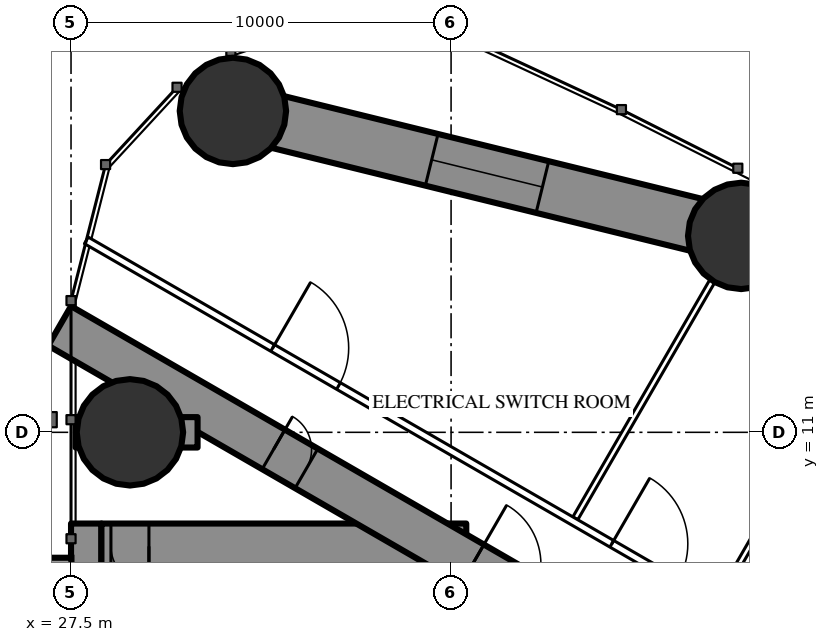
"""IFC4 building model, lengths in metres.
Left out: names, types, materials, properties, quantities, classifications, styles, units other than length and angle.
Written with IfcOpenShell. Run it as: python <this file> out.ifc"""

import sys

from ifc_helpers import new_model, si_unit, direction, frame, frame_2d, origin, origin_2d, place, context, subcontext, project, spatial, rectangle, circle, extrude, element, fill, save


model = new_model("IFC4")
c1 = context("Model", 3, precision=1e-05, world=origin(), true_north=direction((0.0, 1.0)))
c2 = subcontext(c1, "Body", "Model", "MODEL_VIEW")
j1 = project(units=[si_unit("LENGTHUNIT", "METRE"), si_unit("PLANEANGLEUNIT", "RADIAN")], contexts=[c1])
p1 = place(None, origin())
s1 = spatial("IfcSite", under=j1, at=p1, CompositionType="ELEMENT")
p2 = place(p1, origin())
s2 = spatial("IfcBuilding", under=s1, at=p2, CompositionType="ELEMENT")
p3 = place(p2, frame((0.0, 0.0, 201.8)))
s3 = spatial("IfcBuildingStorey", under=s2, at=p3, CompositionType="ELEMENT", Elevation=201.8)
for number, where, z_axis, x_axis in (
    (1, (31.76, 19.456, 0.0), (0.0, 0.0, 1.0), (1.0, 0.0, 0.0)),
    (2, (29.05, 11.0, 0.0), (0.0, 0.0, 1.0), (1.0, 0.0, 0.0)),
    (3, (45.134, 16.168, 0.0), (0.0, 0.0, 1.0), (1.0, 0.0, 0.0)),
):
    element("IfcColumn", number, at=place(p3, frame(where, z_axis=z_axis, x_axis=x_axis)), inside=s3, PredefinedType="COLUMN", context=c2, shape_type="SweptSolid", body=[
        extrude(circle(Radius=1.4, at=origin_2d()), origin(), (0.0, 0.0, 1.0), 3.5),
    ])
p4 = place(p3, frame((27.9, -8.6, 0.0), z_axis=(0.0, 0.0, 1.0), x_axis=(0.0, 1.0, 0.0)))
e4 = element("IfcWall", 4, at=p4, inside=s3, PredefinedType="SHEAR", context=c2, shape_type="SweptSolid", body=[
    extrude(rectangle(XDim=17.2, YDim=0.8, at=frame_2d((8.6, 0.0))), origin(), (0.0, 0.0, 1.0), 3.5),
])
p5 = place(p4, frame((2.45, 0.0, 0.6)))
e5 = element("IfcOpeningElement", 5, at=p5, cuts=e4, PredefinedType="OPENING", context=c2, shape_type="SweptSolid", body=[
    extrude(rectangle(XDim=0.6, YDim=2.1, at=frame_2d((0.3, 1.05))), frame((0.0, 0.41, 0.0), z_axis=(0.0, -1.0, 0.0), x_axis=(1.0, 0.0, 0.0)), (0.0, 0.0, 1.0), 0.82),
])
p6 = place(p4, frame((14.15, 0.0, 0.6)))
e6 = element("IfcOpeningElement", 6, at=p6, cuts=e4, PredefinedType="OPENING", context=c2, shape_type="SweptSolid", body=[
    extrude(rectangle(XDim=0.6, YDim=2.1, at=frame_2d((0.3, 1.05))), frame((0.0, 0.41, 0.0), z_axis=(0.0, -1.0, 0.0), x_axis=(1.0, 0.0, 0.0)), (0.0, 0.0, 1.0), 0.82),
])
p7 = place(p3, frame((37.3, -8.6, 0.0), z_axis=(0.0, 0.0, 1.0), x_axis=(0.0, 1.0, 0.0)))
e7 = element("IfcWall", 7, at=p7, inside=s3, PredefinedType="SHEAR", context=c2, shape_type="SweptSolid", body=[
    extrude(rectangle(XDim=17.2, YDim=1.2, at=frame_2d((8.6, 0.0))), origin(), (0.0, 0.0, 1.0), 3.5),
])
p8 = place(p7, frame((7.7, 0.0, 0.0)))
e8 = element("IfcOpeningElement", 8, at=p8, cuts=e7, PredefinedType="OPENING", context=c2, shape_type="SweptSolid", body=[
    extrude(rectangle(XDim=1.8, YDim=2.2, at=frame_2d((0.9, 1.1))), frame((0.0, 0.61, 0.0), z_axis=(0.0, -1.0, 0.0), x_axis=(1.0, 0.0, 0.0)), (0.0, 0.0, 1.0), 1.22),
])
p9 = place(p3, frame((28.3, 8.0, 0.0), z_axis=(0.0, 0.0, 1.0), x_axis=(1.0, 0.0, 0.0)))
e9 = element("IfcWall", 9, at=p9, inside=s3, PredefinedType="SHEAR", context=c2, shape_type="SweptSolid", body=[
    extrude(rectangle(XDim=8.4, YDim=1.2, at=frame_2d((4.2, 0.0))), origin(), (0.0, 0.0, 1.0), 3.5),
])
p10 = place(p9, frame((0.25, 0.0, 0.0)))
e10 = element("IfcOpeningElement", 10, at=p10, cuts=e9, PredefinedType="OPENING", context=c2, shape_type="SweptSolid", body=[
    extrude(rectangle(XDim=1.0, YDim=2.2, at=frame_2d((0.5, 1.1))), frame((0.0, 0.61, 0.0), z_axis=(0.0, -1.0, 0.0), x_axis=(1.0, 0.0, 0.0)), (0.0, 0.0, 1.0), 1.22),
])
p11 = place(p3, frame((27.2, 13.8, 0.0), z_axis=(0.0, 0.0, 1.0), x_axis=(0.866024515034, -0.500001539357, 0.0)))
e11 = element("IfcWall", 11, at=p11, inside=s3, PredefinedType="SHEAR", context=c2, shape_type="SweptSolid", body=[
    extrude(rectangle(XDim=26.907, YDim=1.2, at=frame_2d((13.454, 0.0))), origin(), (0.0, 0.0, 1.0), 3.5),
])
p12 = place(p11, frame((6.5, 0.0, 0.0)))
e12 = element("IfcOpeningElement", 12, at=p12, cuts=e11, PredefinedType="OPENING", context=c2, shape_type="SweptSolid", body=[
    extrude(rectangle(XDim=1.0, YDim=2.2, at=frame_2d((0.5, 1.1))), frame((0.0, 0.61, 0.0), z_axis=(0.0, -1.0, 0.0), x_axis=(1.0, 0.0, 0.0)), (0.0, 0.0, 1.0), 1.22),
])
p13 = place(p11, frame((12.545, 0.0, 0.0)))
e13 = element("IfcOpeningElement", 13, at=p13, cuts=e11, PredefinedType="OPENING", context=c2, shape_type="SweptSolid", body=[
    extrude(rectangle(XDim=1.8, YDim=2.2, at=frame_2d((0.9, 1.1))), frame((0.0, 0.61, 0.0), z_axis=(0.0, -1.0, 0.0), x_axis=(1.0, 0.0, 0.0)), (0.0, 0.0, 1.0), 1.22),
])
p14 = place(p3, frame((27.62, 11.0, 0.0), z_axis=(0.0, 0.0, 1.0), x_axis=(1.0, 0.0, 0.0)))
e14 = element("IfcWall", 14, at=p14, inside=s3, PredefinedType="SHEAR", context=c2, shape_type="SweptSolid", body=[
    extrude(rectangle(XDim=3.209, YDim=0.8, at=frame_2d((1.605, 0.0))), origin(), (0.0, 0.0, 1.0), 3.5),
])
p15 = place(p3, frame((48.897, 14.121, 0.0), z_axis=(0.0, 0.0, 1.0), x_axis=(-0.878404597051, 0.477917737566, 0.0)))
e15 = element("IfcWall", 15, at=p15, inside=s3, PredefinedType="SHEAR", context=c2, shape_type="SweptSolid", body=[
    extrude(rectangle(XDim=4.285, YDim=1.4, at=frame_2d((2.143, 0.0))), origin(), (0.0, 0.0, 1.0), 3.5),
])
p16 = place(p3, frame((45.134, 16.168, 0.0), z_axis=(0.0, 0.0, 1.0), x_axis=(-0.971093253227, 0.238700426344, 0.0)))
e16 = element("IfcWall", 16, at=p16, inside=s3, PredefinedType="SHEAR", context=c2, shape_type="SweptSolid", body=[
    extrude(rectangle(XDim=13.772, YDim=1.4, at=frame_2d((6.886, 0.0))), origin(), (0.0, 0.0, 1.0), 3.5),
])
p17 = place(p16, frame((5.386, 0.0, 0.6)))
e17 = element("IfcOpeningElement", 17, at=p17, cuts=e16, PredefinedType="OPENING", context=c2, shape_type="SweptSolid", body=[
    extrude(rectangle(XDim=3.0, YDim=1.2, at=frame_2d((1.5, 0.6))), frame((0.0, 0.71, 0.0), z_axis=(0.0, -1.0, 0.0), x_axis=(1.0, 0.0, 0.0)), (0.0, 0.0, 1.0), 1.42),
])
p18 = place(p3, frame((40.769, 8.737, 0.0), z_axis=(0.0, 0.0, 1.0), x_axis=(0.500013115284, 0.866017831539, 0.0)))
e18 = element("IfcWall", 18, at=p18, inside=s3, PredefinedType="PARTITIONING", context=c2, shape_type="SweptSolid", body=[
    extrude(rectangle(XDim=7.198, YDim=0.15, at=frame_2d((3.599, 0.0))), origin(), (0.0, 0.0, 1.0), 2.05),
])
p19 = place(p3, frame((44.521, 6.571, 0.0), z_axis=(0.0, 0.0, 1.0), x_axis=(0.500020376429, 0.866013639128, 0.0)))
e19 = element("IfcWall", 19, at=p19, inside=s3, PredefinedType="PARTITIONING", context=c2, shape_type="SweptSolid", body=[
    extrude(rectangle(XDim=7.306, YDim=0.15, at=frame_2d((3.653, 0.0))), origin(), (0.0, 0.0, 1.0), 2.05),
])
p20 = place(p3, frame((27.903, 16.05, 0.0), z_axis=(0.0, 0.0, 1.0), x_axis=(0.866024818307, -0.500001014076, 0.0)))
e20 = element("IfcWall", 20, at=p20, inside=s3, PredefinedType="PARTITIONING", context=c2, shape_type="SweptSolid", body=[
    extrude(rectangle(XDim=21.723, YDim=0.2, at=frame_2d((10.862, 0.0))), origin(), (0.0, 0.0, 1.0), 3.25),
])
p21 = place(p20, frame((15.966, 0.0, 0.0)))
e21 = element("IfcOpeningElement", 21, at=p21, cuts=e20, PredefinedType="OPENING", context=c2, shape_type="SweptSolid", body=[
    extrude(rectangle(XDim=2.0, YDim=2.03, at=frame_2d((1.0, 1.015))), frame((0.0, 0.11, 0.0), z_axis=(0.0, -1.0, 0.0), x_axis=(1.0, 0.0, 0.0)), (0.0, 0.0, 1.0), 0.22),
])
p22 = place(p20, frame((5.662, 0.0, 0.0)))
e22 = element("IfcOpeningElement", 22, at=p22, cuts=e20, PredefinedType="OPENING", context=c2, shape_type="SweptSolid", body=[
    extrude(rectangle(XDim=2.0, YDim=2.4, at=frame_2d((1.0, 1.2))), frame((0.0, 0.11, 0.0), z_axis=(0.0, -1.0, 0.0), x_axis=(1.0, 0.0, 0.0)), (0.0, 0.0, 1.0), 0.22),
])
p23 = place(p20, frame((19.415, 0.0, 0.0)))
e23 = element("IfcOpeningElement", 23, at=p23, cuts=e20, PredefinedType="OPENING", context=c2, shape_type="SweptSolid", body=[
    extrude(rectangle(XDim=1.8, YDim=2.2, at=frame_2d((0.9, 1.1))), frame((0.0, 0.11, 0.0), z_axis=(0.0, -1.0, 0.0), x_axis=(1.0, 0.0, 0.0)), (0.0, 0.0, 1.0), 0.22),
])
p24 = place(p17, origin())
e24 = element("IfcWindow", 24, at=p24, inside=s3, PartitioningType="SINGLE_PANEL", PredefinedType="WINDOW", context=c2, shape_type="SweptSolid", body=[
    extrude(rectangle(XDim=3.0, YDim=1.2, at=frame_2d((1.5, 0.6))), frame((0.0, 0.03, 0.0), z_axis=(0.0, -1.0, 0.0), x_axis=(1.0, 0.0, 0.0)), (0.0, 0.0, 1.0), 0.06),
])
fill(e17, e24)
p25 = place(p21, origin())
e25 = element("IfcDoor", 25, at=p25, inside=s3, OperationType="DOUBLE_DOOR_SINGLE_SWING", PredefinedType="DOOR", context=c2, shape_type="SweptSolid", body=[
    extrude(rectangle(XDim=2.0, YDim=2.03, at=frame_2d((1.0, 1.015))), frame((0.0, 0.025, 0.0), z_axis=(0.0, -1.0, 0.0), x_axis=(1.0, 0.0, 0.0)), (0.0, 0.0, 1.0), 0.05),
])
fill(e21, e25)
p26 = place(p22, origin())
e26 = element("IfcDoor", 26, at=p26, inside=s3, OperationType="DOUBLE_DOOR_SINGLE_SWING", PredefinedType="DOOR", context=c2, shape_type="SweptSolid", body=[
    extrude(rectangle(XDim=2.0, YDim=2.4, at=frame_2d((1.0, 1.2))), frame((0.0, 0.025, 0.0), z_axis=(0.0, -1.0, 0.0), x_axis=(1.0, 0.0, 0.0)), (0.0, 0.0, 1.0), 0.05),
])
fill(e22, e26)
p27 = place(p12, origin())
e27 = element("IfcDoor", 27, at=p27, inside=s3, OperationType="SINGLE_SWING_LEFT", PredefinedType="DOOR", context=c2, shape_type="SweptSolid", body=[
    extrude(rectangle(XDim=1.0, YDim=2.2, at=frame_2d((0.5, 1.1))), frame((0.0, 0.025, 0.0), z_axis=(0.0, -1.0, 0.0), x_axis=(1.0, 0.0, 0.0)), (0.0, 0.0, 1.0), 0.05),
])
fill(e12, e27)
p28 = place(p10, origin())
e28 = element("IfcDoor", 28, at=p28, inside=s3, OperationType="SINGLE_SWING_RIGHT", PredefinedType="DOOR", context=c2, shape_type="SweptSolid", body=[
    extrude(rectangle(XDim=1.0, YDim=2.2, at=frame_2d((0.5, 1.1))), frame((0.0, 0.025, 0.0), z_axis=(0.0, -1.0, 0.0), x_axis=(1.0, 0.0, 0.0)), (0.0, 0.0, 1.0), 0.05),
])
fill(e10, e28)
save(model, sys.argv[1])
